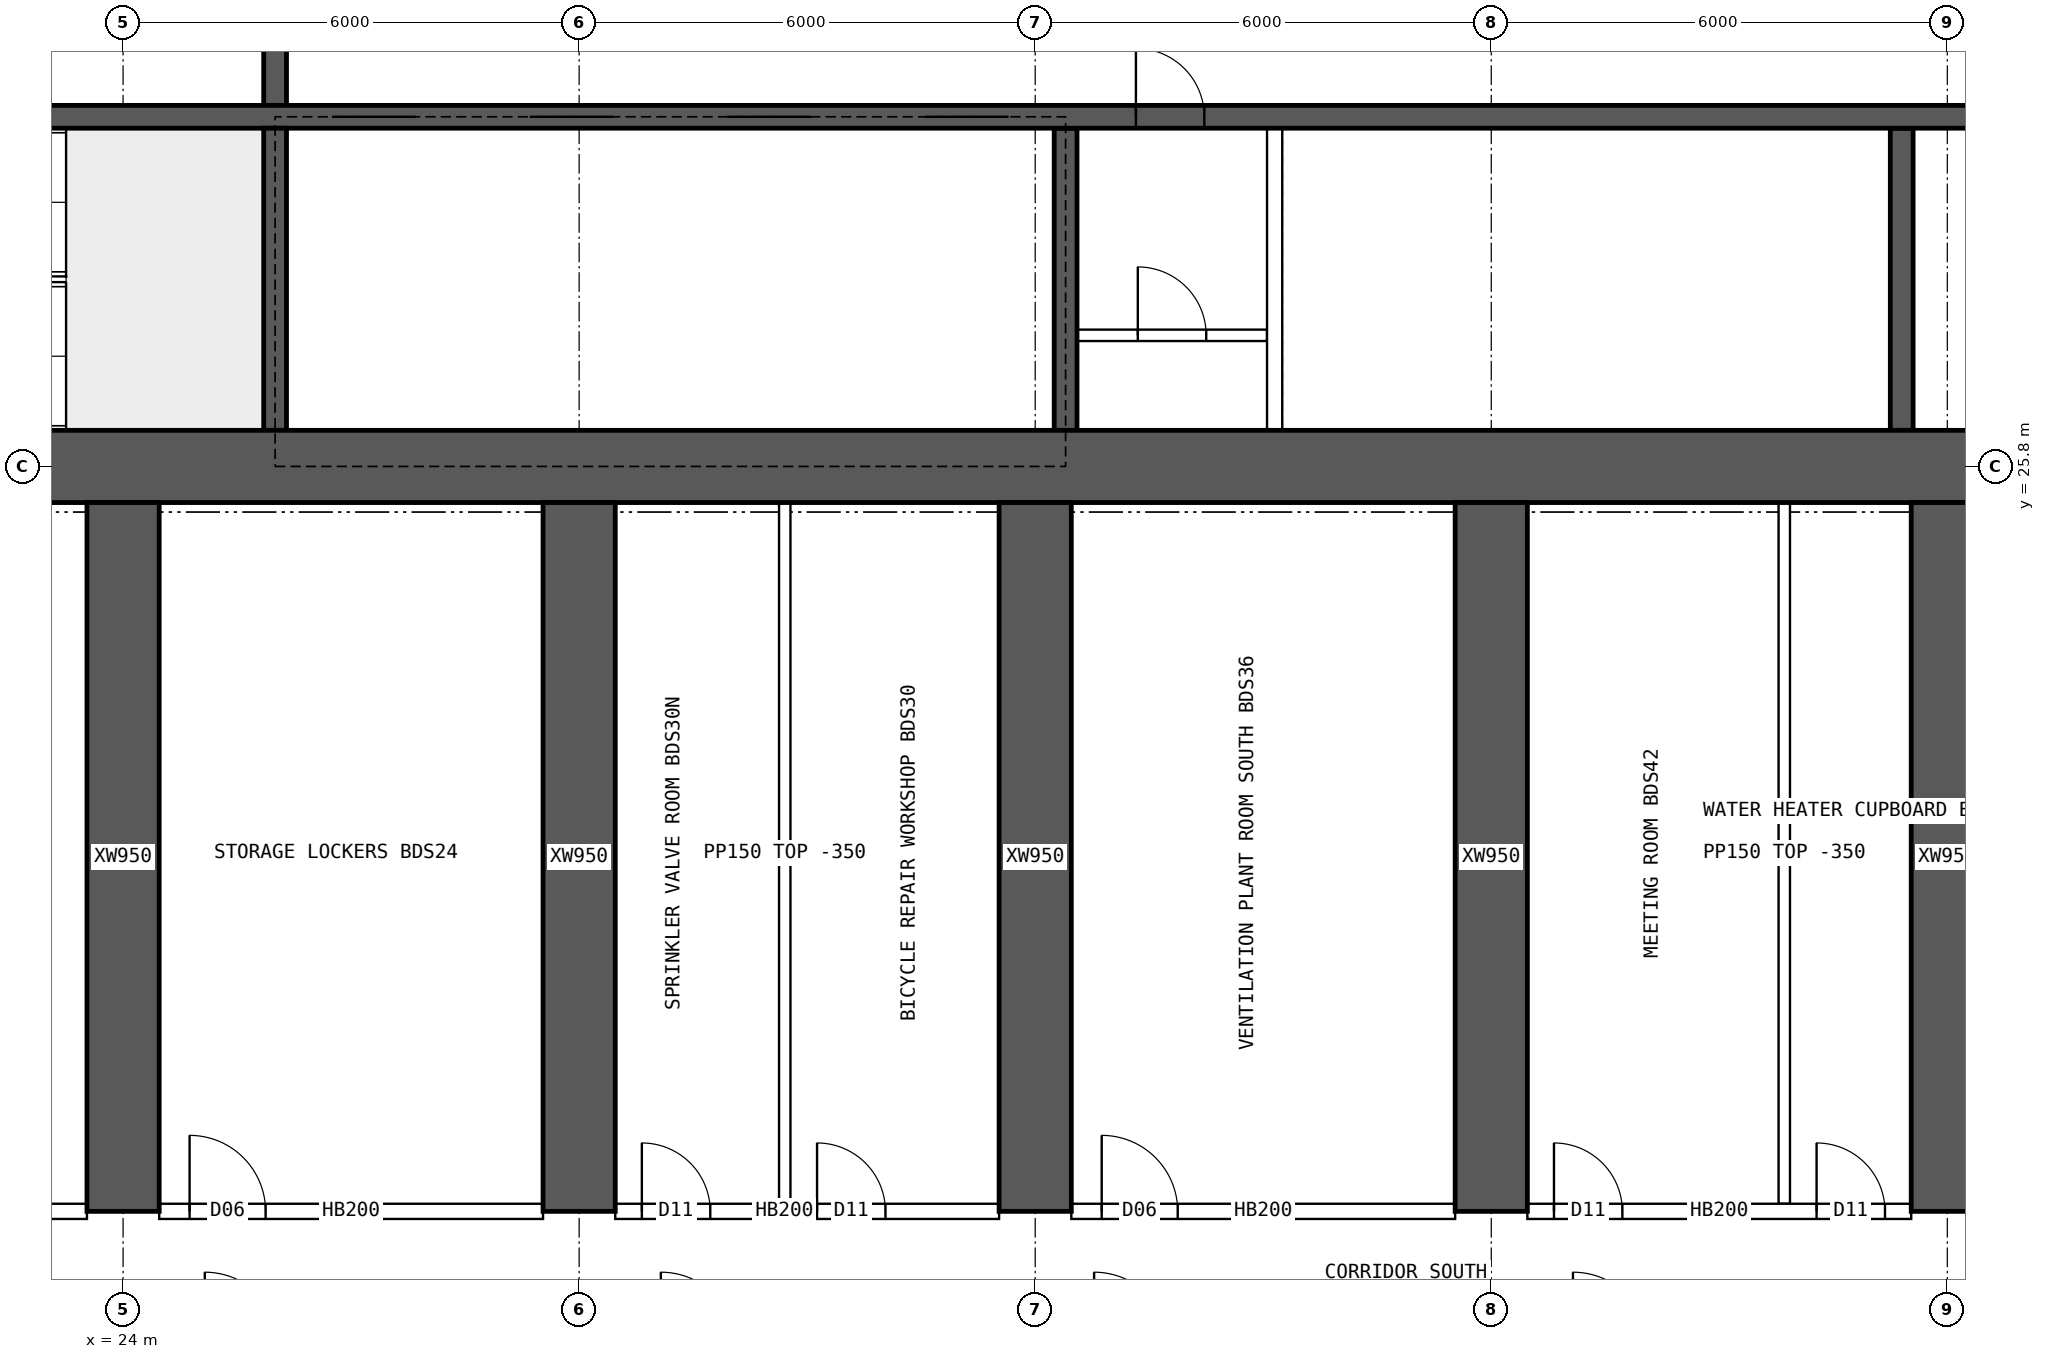
"""IFC4 building model, lengths in metres.
Left out: names, types, materials, properties, quantities, classifications, styles, units other than length and angle.
Written with IfcOpenShell. Run it as: python <this file> out.ifc"""

import sys

from ifc_helpers import new_model, si_unit, direction, frame, frame_2d, origin, place, context, subcontext, project, spatial, rectangle, extrude, element, fill, save


model = new_model("IFC4")
c1 = context("Model", 3, precision=1e-05, world=origin(), true_north=direction((0.0, 1.0)))
c2 = subcontext(c1, "Body", "Model", "MODEL_VIEW")
j1 = project(units=[si_unit("LENGTHUNIT", "METRE"), si_unit("PLANEANGLEUNIT", "RADIAN")], contexts=[c1])
p1 = place(None, origin())
s1 = spatial("IfcSite", under=j1, at=p1, CompositionType="ELEMENT")
p2 = place(p1, origin())
s2 = spatial("IfcBuilding", under=s1, at=p2, CompositionType="ELEMENT")
p3 = place(p2, frame((0.0, 0.0, 129.4)))
s3 = spatial("IfcBuildingStorey", under=s2, at=p3, CompositionType="ELEMENT", Elevation=129.4)
p4 = place(p3, frame((18.0, 25.8, 0.0), z_axis=(0.0, 0.0, 1.0), x_axis=(1.0, 0.0, 0.0)))
e1 = element("IfcWall", 1, at=p4, inside=s3, PredefinedType="SHEAR", context=c2, shape_type="SweptSolid", body=[
    extrude(rectangle(XDim=48.0, YDim=0.95, at=frame_2d((24.0, 0.0))), origin(), (0.0, 0.0, 1.0), 3.75),
])
p5 = place(p3, frame((18.475, 30.4, 0.0), z_axis=(0.0, 0.0, 1.0), x_axis=(1.0, 0.0, 0.0)))
e2 = element("IfcWall", 2, at=p5, inside=s3, PredefinedType="SHEAR", context=c2, shape_type="SweptSolid", body=[
    extrude(rectangle(XDim=47.05, YDim=0.3, at=frame_2d((23.525, 0.0))), origin(), (0.0, 0.0, 1.0), 3.75),
])
p6 = place(p5, frame((0.4, 0.0, 0.0)))
e3 = element("IfcOpeningElement", 3, at=p6, cuts=e2, PredefinedType="OPENING", context=c2, shape_type="SweptSolid", body=[
    extrude(rectangle(XDim=1.0, YDim=2.1, at=frame_2d((0.5, 1.05))), frame((0.0, 0.16, 0.0), z_axis=(0.0, -1.0, 0.0), x_axis=(1.0, 0.0, 0.0)), (0.0, 0.0, 1.0), 0.32),
])
p7 = place(p5, frame((45.65, 0.0, 0.0)))
e4 = element("IfcOpeningElement", 4, at=p7, cuts=e2, PredefinedType="OPENING", context=c2, shape_type="SweptSolid", body=[
    extrude(rectangle(XDim=1.0, YDim=2.1, at=frame_2d((0.5, 1.05))), frame((0.0, 0.16, 0.0), z_axis=(0.0, -1.0, 0.0), x_axis=(1.0, 0.0, 0.0)), (0.0, 0.0, 1.0), 0.32),
])
p8 = place(p5, frame((8.275, 0.0, 0.0)))
e5 = element("IfcOpeningElement", 5, at=p8, cuts=e2, PredefinedType="OPENING", context=c2, shape_type="SweptSolid", body=[
    extrude(rectangle(XDim=1.1, YDim=2.1, at=frame_2d((0.55, 1.05))), frame((0.0, 0.16, 0.0), z_axis=(0.0, -1.0, 0.0), x_axis=(1.0, 0.0, 0.0)), (0.0, 0.0, 1.0), 0.32),
])
p9 = place(p5, frame((10.875, 0.0, 0.0)))
e6 = element("IfcOpeningElement", 6, at=p9, cuts=e2, PredefinedType="OPENING", context=c2, shape_type="SweptSolid", body=[
    extrude(rectangle(XDim=1.1, YDim=2.1, at=frame_2d((0.55, 1.05))), frame((0.0, 0.16, 0.0), z_axis=(0.0, -1.0, 0.0), x_axis=(1.0, 0.0, 0.0)), (0.0, 0.0, 1.0), 0.32),
])
p10 = place(p5, frame((13.475, 0.0, 0.0)))
e7 = element("IfcOpeningElement", 7, at=p10, cuts=e2, PredefinedType="OPENING", context=c2, shape_type="SweptSolid", body=[
    extrude(rectangle(XDim=1.1, YDim=2.1, at=frame_2d((0.55, 1.05))), frame((0.0, 0.16, 0.0), z_axis=(0.0, -1.0, 0.0), x_axis=(1.0, 0.0, 0.0)), (0.0, 0.0, 1.0), 0.32),
])
p11 = place(p5, frame((16.075, 0.0, 0.0)))
e8 = element("IfcOpeningElement", 8, at=p11, cuts=e2, PredefinedType="OPENING", context=c2, shape_type="SweptSolid", body=[
    extrude(rectangle(XDim=1.1, YDim=2.1, at=frame_2d((0.55, 1.05))), frame((0.0, 0.16, 0.0), z_axis=(0.0, -1.0, 0.0), x_axis=(1.0, 0.0, 0.0)), (0.0, 0.0, 1.0), 0.32),
])
p12 = place(p5, frame((18.85, 0.0, 0.0)))
e9 = element("IfcOpeningElement", 9, at=p12, cuts=e2, PredefinedType="OPENING", context=c2, shape_type="SweptSolid", body=[
    extrude(rectangle(XDim=0.9, YDim=2.1, at=frame_2d((0.45, 1.05))), frame((0.0, 0.16, 0.0), z_axis=(0.0, -1.0, 0.0), x_axis=(1.0, 0.0, 0.0)), (0.0, 0.0, 1.0), 0.32),
])
p13 = place(p5, frame((30.142, 0.0, 0.0)))
e10 = element("IfcOpeningElement", 10, at=p13, cuts=e2, PredefinedType="OPENING", context=c2, shape_type="SweptSolid", body=[
    extrude(rectangle(XDim=1.1, YDim=2.1, at=frame_2d((0.55, 1.05))), frame((0.0, 0.16, 0.0), z_axis=(0.0, -1.0, 0.0), x_axis=(1.0, 0.0, 0.0)), (0.0, 0.0, 1.0), 0.32),
])
p14 = place(p5, frame((33.675, 0.0, 0.0)))
e11 = element("IfcOpeningElement", 11, at=p14, cuts=e2, PredefinedType="OPENING", context=c2, shape_type="SweptSolid", body=[
    extrude(rectangle(XDim=1.1, YDim=2.1, at=frame_2d((0.55, 1.05))), frame((0.0, 0.16, 0.0), z_axis=(0.0, -1.0, 0.0), x_axis=(1.0, 0.0, 0.0)), (0.0, 0.0, 1.0), 0.32),
])
p15 = place(p5, frame((37.208, 0.0, 0.0)))
e12 = element("IfcOpeningElement", 12, at=p15, cuts=e2, PredefinedType="OPENING", context=c2, shape_type="SweptSolid", body=[
    extrude(rectangle(XDim=1.1, YDim=2.1, at=frame_2d((0.55, 1.05))), frame((0.0, 0.16, 0.0), z_axis=(0.0, -1.0, 0.0), x_axis=(1.0, 0.0, 0.0)), (0.0, 0.0, 1.0), 0.32),
])
p16 = place(p3, frame((26.0, 26.275, 0.0), z_axis=(0.0, 0.0, 1.0), x_axis=(0.0, 1.0, 0.0)))
e13 = element("IfcWall", 13, at=p16, inside=s3, PredefinedType="SHEAR", context=c2, shape_type="SweptSolid", body=[
    extrude(rectangle(XDim=3.975, YDim=0.3, at=frame_2d((1.988, 0.0))), origin(), (0.0, 0.0, 1.0), 3.75),
])
p17 = place(p3, frame((26.0, 30.55, 0.0), z_axis=(0.0, 0.0, 1.0), x_axis=(0.0, 1.0, 0.0)))
e14 = element("IfcWall", 14, at=p17, inside=s3, PredefinedType="SHEAR", context=c2, shape_type="SweptSolid", body=[
    extrude(rectangle(XDim=3.9, YDim=0.3, at=frame_2d((1.95, 0.0))), origin(), (0.0, 0.0, 1.0), 3.75),
])
p18 = place(p17, frame((1.4, 0.0, 0.0)))
e15 = element("IfcOpeningElement", 15, at=p18, cuts=e14, PredefinedType="OPENING", context=c2, shape_type="SweptSolid", body=[
    extrude(rectangle(XDim=1.2, YDim=2.1, at=frame_2d((0.6, 1.05))), frame((0.0, 0.16, 0.0), z_axis=(0.0, -1.0, 0.0), x_axis=(1.0, 0.0, 0.0)), (0.0, 0.0, 1.0), 0.32),
])
for number, where, z_axis, x_axis in (
    (16, (36.4, 26.275, 0.0), (0.0, 0.0, 1.0), (0.0, 1.0, 0.0)),
    (17, (47.4, 26.275, 0.0), (0.0, 0.0, 1.0), (0.0, 1.0, 0.0)),
):
    element("IfcWall", number, at=place(p3, frame(where, z_axis=z_axis, x_axis=x_axis)), inside=s3, PredefinedType="SHEAR", context=c2, shape_type="SweptSolid", body=[
        extrude(rectangle(XDim=3.975, YDim=0.3, at=frame_2d((1.988, 0.0))), origin(), (0.0, 0.0, 1.0), 3.75),
    ])
for number, where, z_axis, x_axis in (
    (18, (24.0, 16.0, 0.0), (0.0, 0.0, 1.0), (0.0, 1.0, 0.0)),
    (19, (30.0, 16.0, 0.0), (0.0, 0.0, 1.0), (0.0, 1.0, 0.0)),
    (20, (36.0, 16.0, 0.0), (0.0, 0.0, 1.0), (0.0, 1.0, 0.0)),
    (21, (42.0, 16.0, 0.0), (0.0, 0.0, 1.0), (0.0, 1.0, 0.0)),
    (22, (48.0, 16.0, 0.0), (0.0, 0.0, 1.0), (0.0, 1.0, 0.0)),
):
    element("IfcWall", number, at=place(p3, frame(where, z_axis=z_axis, x_axis=x_axis)), inside=s3, PredefinedType="SHEAR", context=c2, shape_type="SweptSolid", body=[
        extrude(rectangle(XDim=9.325, YDim=0.95, at=frame_2d((4.663, 0.0))), origin(), (0.0, 0.0, 1.0), 3.75),
    ])
p19 = place(p3, frame((36.55, 27.525, 0.0), z_axis=(0.0, 0.0, 1.0), x_axis=(1.0, 0.0, 0.0)))
e23 = element("IfcWall", 23, at=p19, inside=s3, PredefinedType="SOLIDWALL", context=c2, shape_type="SweptSolid", body=[
    extrude(rectangle(XDim=2.5, YDim=0.15, at=frame_2d((1.25, 0.0))), origin(), (0.0, 0.0, 1.0), 3.4),
])
p20 = place(p19, frame((0.8, 0.0, 0.0)))
e24 = element("IfcOpeningElement", 24, at=p20, cuts=e23, PredefinedType="OPENING", context=c2, shape_type="SweptSolid", body=[
    extrude(rectangle(XDim=0.9, YDim=2.1, at=frame_2d((0.45, 1.05))), frame((0.0, 0.085, 0.0), z_axis=(0.0, -1.0, 0.0), x_axis=(1.0, 0.0, 0.0)), (0.0, 0.0, 1.0), 0.17),
])
p21 = place(p3, frame((39.15, 26.275, 0.0), z_axis=(0.0, 0.0, 1.0), x_axis=(0.0, 1.0, 0.0)))
e25 = element("IfcWall", 25, at=p21, inside=s3, PredefinedType="SOLIDWALL", context=c2, shape_type="SweptSolid", body=[
    extrude(rectangle(XDim=3.975, YDim=0.2, at=frame_2d((1.988, 0.0))), origin(), (0.0, 0.0, 1.0), 3.4),
])
p22 = place(p3, frame((18.475, 16.0, 0.0), z_axis=(0.0, 0.0, 1.0), x_axis=(1.0, 0.0, 0.0)))
e26 = element("IfcWall", 26, at=p22, inside=s3, PredefinedType="SOLIDWALL", context=c2, shape_type="SweptSolid", body=[
    extrude(rectangle(XDim=5.05, YDim=0.2, at=frame_2d((2.525, 0.0))), origin(), (0.0, 0.0, 1.0), 3.4),
])
p23 = place(p22, frame((0.35, 0.0, 0.0)))
e27 = element("IfcOpeningElement", 27, at=p23, cuts=e26, PredefinedType="OPENING", context=c2, shape_type="SweptSolid", body=[
    extrude(rectangle(XDim=0.9, YDim=2.1, at=frame_2d((0.45, 1.05))), frame((0.0, 0.11, 0.0), z_axis=(0.0, -1.0, 0.0), x_axis=(1.0, 0.0, 0.0)), (0.0, 0.0, 1.0), 0.22),
])
p24 = place(p22, frame((3.215, 0.0, 0.0)))
e28 = element("IfcOpeningElement", 28, at=p24, cuts=e26, PredefinedType="OPENING", context=c2, shape_type="SweptSolid", body=[
    extrude(rectangle(XDim=0.9, YDim=2.1, at=frame_2d((0.45, 1.05))), frame((0.0, 0.11, 0.0), z_axis=(0.0, -1.0, 0.0), x_axis=(1.0, 0.0, 0.0)), (0.0, 0.0, 1.0), 0.22),
])
p25 = place(p3, frame((24.475, 16.0, 0.0), z_axis=(0.0, 0.0, 1.0), x_axis=(1.0, 0.0, 0.0)))
e29 = element("IfcWall", 29, at=p25, inside=s3, PredefinedType="SOLIDWALL", context=c2, shape_type="SweptSolid", body=[
    extrude(rectangle(XDim=5.05, YDim=0.2, at=frame_2d((2.525, 0.0))), origin(), (0.0, 0.0, 1.0), 3.4),
])
p26 = place(p25, frame((0.4, 0.0, 0.0)))
e30 = element("IfcOpeningElement", 30, at=p26, cuts=e29, PredefinedType="OPENING", context=c2, shape_type="SweptSolid", body=[
    extrude(rectangle(XDim=1.0, YDim=2.1, at=frame_2d((0.5, 1.05))), frame((0.0, 0.11, 0.0), z_axis=(0.0, -1.0, 0.0), x_axis=(1.0, 0.0, 0.0)), (0.0, 0.0, 1.0), 0.22),
])
p27 = place(p3, frame((30.475, 16.0, 0.0), z_axis=(0.0, 0.0, 1.0), x_axis=(1.0, 0.0, 0.0)))
e31 = element("IfcWall", 31, at=p27, inside=s3, PredefinedType="SOLIDWALL", context=c2, shape_type="SweptSolid", body=[
    extrude(rectangle(XDim=5.05, YDim=0.2, at=frame_2d((2.525, 0.0))), origin(), (0.0, 0.0, 1.0), 3.4),
])
p28 = place(p27, frame((0.35, 0.0, 0.0)))
e32 = element("IfcOpeningElement", 32, at=p28, cuts=e31, PredefinedType="OPENING", context=c2, shape_type="SweptSolid", body=[
    extrude(rectangle(XDim=0.9, YDim=2.1, at=frame_2d((0.45, 1.05))), frame((0.0, 0.11, 0.0), z_axis=(0.0, -1.0, 0.0), x_axis=(1.0, 0.0, 0.0)), (0.0, 0.0, 1.0), 0.22),
])
p29 = place(p27, frame((2.655, 0.0, 0.0)))
e33 = element("IfcOpeningElement", 33, at=p29, cuts=e31, PredefinedType="OPENING", context=c2, shape_type="SweptSolid", body=[
    extrude(rectangle(XDim=0.9, YDim=2.1, at=frame_2d((0.45, 1.05))), frame((0.0, 0.11, 0.0), z_axis=(0.0, -1.0, 0.0), x_axis=(1.0, 0.0, 0.0)), (0.0, 0.0, 1.0), 0.22),
])
p30 = place(p3, frame((36.475, 16.0, 0.0), z_axis=(0.0, 0.0, 1.0), x_axis=(1.0, 0.0, 0.0)))
e34 = element("IfcWall", 34, at=p30, inside=s3, PredefinedType="SOLIDWALL", context=c2, shape_type="SweptSolid", body=[
    extrude(rectangle(XDim=5.05, YDim=0.2, at=frame_2d((2.525, 0.0))), origin(), (0.0, 0.0, 1.0), 3.4),
])
p31 = place(p30, frame((0.4, 0.0, 0.0)))
e35 = element("IfcOpeningElement", 35, at=p31, cuts=e34, PredefinedType="OPENING", context=c2, shape_type="SweptSolid", body=[
    extrude(rectangle(XDim=1.0, YDim=2.1, at=frame_2d((0.5, 1.05))), frame((0.0, 0.11, 0.0), z_axis=(0.0, -1.0, 0.0), x_axis=(1.0, 0.0, 0.0)), (0.0, 0.0, 1.0), 0.22),
])
p32 = place(p3, frame((42.475, 16.0, 0.0), z_axis=(0.0, 0.0, 1.0), x_axis=(1.0, 0.0, 0.0)))
e36 = element("IfcWall", 36, at=p32, inside=s3, PredefinedType="SOLIDWALL", context=c2, shape_type="SweptSolid", body=[
    extrude(rectangle(XDim=5.05, YDim=0.2, at=frame_2d((2.525, 0.0))), origin(), (0.0, 0.0, 1.0), 3.4),
])
p33 = place(p32, frame((0.35, 0.0, 0.0)))
e37 = element("IfcOpeningElement", 37, at=p33, cuts=e36, PredefinedType="OPENING", context=c2, shape_type="SweptSolid", body=[
    extrude(rectangle(XDim=0.9, YDim=2.1, at=frame_2d((0.45, 1.05))), frame((0.0, 0.11, 0.0), z_axis=(0.0, -1.0, 0.0), x_axis=(1.0, 0.0, 0.0)), (0.0, 0.0, 1.0), 0.22),
])
p34 = place(p32, frame((3.805, 0.0, 0.0)))
e38 = element("IfcOpeningElement", 38, at=p34, cuts=e36, PredefinedType="OPENING", context=c2, shape_type="SweptSolid", body=[
    extrude(rectangle(XDim=0.9, YDim=2.1, at=frame_2d((0.45, 1.05))), frame((0.0, 0.11, 0.0), z_axis=(0.0, -1.0, 0.0), x_axis=(1.0, 0.0, 0.0)), (0.0, 0.0, 1.0), 0.22),
])
for number, where, z_axis, x_axis in (
    (39, (32.705, 16.1, 0.0), (0.0, 0.0, 1.0), (0.0, 1.0, 0.0)),
    (40, (45.855, 16.1, 0.0), (0.0, 0.0, 1.0), (0.0, 1.0, 0.0)),
):
    element("IfcWall", number, at=place(p3, frame(where, z_axis=z_axis, x_axis=x_axis)), inside=s3, PredefinedType="PARTITIONING", context=c2, shape_type="SweptSolid", body=[
        extrude(rectangle(XDim=9.225, YDim=0.15, at=frame_2d((4.612, 0.0))), origin(), (0.0, 0.0, 1.0), 3.4),
    ])
p35 = place(p8, origin())
e41 = element("IfcDoor", 41, at=p35, inside=s3, OperationType="DOUBLE_DOOR_SLIDING", PredefinedType="DOOR", context=c2, shape_type="SweptSolid", body=[
    extrude(rectangle(XDim=1.1, YDim=2.1, at=frame_2d((0.55, 1.05))), frame((0.0, 0.025, 0.0), z_axis=(0.0, -1.0, 0.0), x_axis=(1.0, 0.0, 0.0)), (0.0, 0.0, 1.0), 0.05),
])
fill(e5, e41)
p36 = place(p9, origin())
e42 = element("IfcDoor", 42, at=p36, inside=s3, OperationType="DOUBLE_DOOR_SLIDING", PredefinedType="DOOR", context=c2, shape_type="SweptSolid", body=[
    extrude(rectangle(XDim=1.1, YDim=2.1, at=frame_2d((0.55, 1.05))), frame((0.0, 0.025, 0.0), z_axis=(0.0, -1.0, 0.0), x_axis=(1.0, 0.0, 0.0)), (0.0, 0.0, 1.0), 0.05),
])
fill(e6, e42)
p37 = place(p10, origin())
e43 = element("IfcDoor", 43, at=p37, inside=s3, OperationType="DOUBLE_DOOR_SLIDING", PredefinedType="DOOR", context=c2, shape_type="SweptSolid", body=[
    extrude(rectangle(XDim=1.1, YDim=2.1, at=frame_2d((0.55, 1.05))), frame((0.0, 0.025, 0.0), z_axis=(0.0, -1.0, 0.0), x_axis=(1.0, 0.0, 0.0)), (0.0, 0.0, 1.0), 0.05),
])
fill(e7, e43)
p38 = place(p11, origin())
e44 = element("IfcDoor", 44, at=p38, inside=s3, OperationType="DOUBLE_DOOR_SLIDING", PredefinedType="DOOR", context=c2, shape_type="SweptSolid", body=[
    extrude(rectangle(XDim=1.1, YDim=2.1, at=frame_2d((0.55, 1.05))), frame((0.0, 0.025, 0.0), z_axis=(0.0, -1.0, 0.0), x_axis=(1.0, 0.0, 0.0)), (0.0, 0.0, 1.0), 0.05),
])
fill(e8, e44)
p39 = place(p20, origin())
e45 = element("IfcDoor", 45, at=p39, inside=s3, OperationType="SINGLE_SWING_LEFT", PredefinedType="DOOR", context=c2, shape_type="SweptSolid", body=[
    extrude(rectangle(XDim=0.9, YDim=2.1, at=frame_2d((0.45, 1.05))), frame((0.0, 0.025, 0.0), z_axis=(0.0, -1.0, 0.0), x_axis=(1.0, 0.0, 0.0)), (0.0, 0.0, 1.0), 0.05),
])
fill(e24, e45)
p40 = place(p12, origin())
e46 = element("IfcDoor", 46, at=p40, inside=s3, OperationType="SINGLE_SWING_LEFT", PredefinedType="DOOR", context=c2, shape_type="SweptSolid", body=[
    extrude(rectangle(XDim=0.9, YDim=2.1, at=frame_2d((0.45, 1.05))), frame((0.0, 0.025, 0.0), z_axis=(0.0, -1.0, 0.0), x_axis=(1.0, 0.0, 0.0)), (0.0, 0.0, 1.0), 0.05),
])
fill(e9, e46)
p41 = place(p26, origin())
e47 = element("IfcDoor", 47, at=p41, inside=s3, OperationType="SINGLE_SWING_LEFT", PredefinedType="DOOR", context=c2, shape_type="SweptSolid", body=[
    extrude(rectangle(XDim=1.0, YDim=2.1, at=frame_2d((0.5, 1.05))), frame((0.0, 0.025, 0.0), z_axis=(0.0, -1.0, 0.0), x_axis=(1.0, 0.0, 0.0)), (0.0, 0.0, 1.0), 0.05),
])
fill(e30, e47)
p42 = place(p28, origin())
e48 = element("IfcDoor", 48, at=p42, inside=s3, OperationType="SINGLE_SWING_LEFT", PredefinedType="DOOR", context=c2, shape_type="SweptSolid", body=[
    extrude(rectangle(XDim=0.9, YDim=2.1, at=frame_2d((0.45, 1.05))), frame((0.0, 0.025, 0.0), z_axis=(0.0, -1.0, 0.0), x_axis=(1.0, 0.0, 0.0)), (0.0, 0.0, 1.0), 0.05),
])
fill(e32, e48)
p43 = place(p29, origin())
e49 = element("IfcDoor", 49, at=p43, inside=s3, OperationType="SINGLE_SWING_LEFT", PredefinedType="DOOR", context=c2, shape_type="SweptSolid", body=[
    extrude(rectangle(XDim=0.9, YDim=2.1, at=frame_2d((0.45, 1.05))), frame((0.0, 0.025, 0.0), z_axis=(0.0, -1.0, 0.0), x_axis=(1.0, 0.0, 0.0)), (0.0, 0.0, 1.0), 0.05),
])
fill(e33, e49)
p44 = place(p31, origin())
e50 = element("IfcDoor", 50, at=p44, inside=s3, OperationType="SINGLE_SWING_LEFT", PredefinedType="DOOR", context=c2, shape_type="SweptSolid", body=[
    extrude(rectangle(XDim=1.0, YDim=2.1, at=frame_2d((0.5, 1.05))), frame((0.0, 0.025, 0.0), z_axis=(0.0, -1.0, 0.0), x_axis=(1.0, 0.0, 0.0)), (0.0, 0.0, 1.0), 0.05),
])
fill(e35, e50)
p45 = place(p33, origin())
e51 = element("IfcDoor", 51, at=p45, inside=s3, OperationType="SINGLE_SWING_LEFT", PredefinedType="DOOR", context=c2, shape_type="SweptSolid", body=[
    extrude(rectangle(XDim=0.9, YDim=2.1, at=frame_2d((0.45, 1.05))), frame((0.0, 0.025, 0.0), z_axis=(0.0, -1.0, 0.0), x_axis=(1.0, 0.0, 0.0)), (0.0, 0.0, 1.0), 0.05),
])
fill(e37, e51)
p46 = place(p34, origin())
e52 = element("IfcDoor", 52, at=p46, inside=s3, OperationType="SINGLE_SWING_LEFT", PredefinedType="DOOR", context=c2, shape_type="SweptSolid", body=[
    extrude(rectangle(XDim=0.9, YDim=2.1, at=frame_2d((0.45, 1.05))), frame((0.0, 0.025, 0.0), z_axis=(0.0, -1.0, 0.0), x_axis=(1.0, 0.0, 0.0)), (0.0, 0.0, 1.0), 0.05),
])
fill(e38, e52)
save(model, sys.argv[1])
